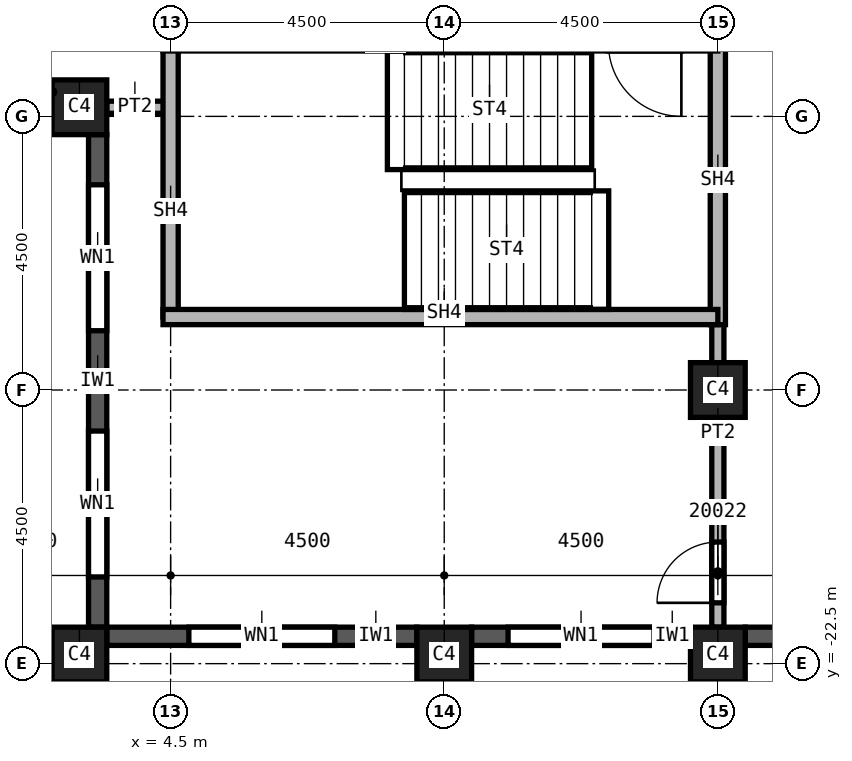
"""IFC4 building model, lengths in metres.
Left out: names, types, materials, properties, quantities, classifications, styles, units other than length and angle.
Written with IfcOpenShell. Run it as: python <this file> out.ifc"""

import sys

from ifc_helpers import new_model, si_unit, direction, frame, frame_2d, origin, origin_2d, place, context, subcontext, project, spatial, rectangle, extrude, element, fill, save


model = new_model("IFC4")
c1 = context("Model", 3, precision=1e-05, world=origin(), true_north=direction((0.0, 1.0)))
c2 = subcontext(c1, "Body", "Model", "MODEL_VIEW")
j1 = project(units=[si_unit("LENGTHUNIT", "METRE"), si_unit("PLANEANGLEUNIT", "RADIAN")], contexts=[c1])
p1 = place(None, origin())
s1 = spatial("IfcSite", under=j1, at=p1, CompositionType="ELEMENT")
p2 = place(p1, origin())
s2 = spatial("IfcBuilding", under=s1, at=p2, CompositionType="ELEMENT")
p3 = place(p2, frame((0.0, 0.0, 290.0)))
s3 = spatial("IfcBuildingStorey", under=s2, at=p3, CompositionType="ELEMENT", Elevation=290.0)
for number, where, z_axis, x_axis in (
    (1, (13.5, -18.0, 0.0), (0.0, 0.0, 1.0), (1.0, 0.0, 0.0)),
    (2, (3.0, -22.35, 0.0), (0.0, 0.0, 1.0), (1.0, 0.0, 0.0)),
    (3, (9.0, -22.35, 0.0), (0.0, 0.0, 1.0), (1.0, 0.0, 0.0)),
    (4, (13.5, -22.35, 0.0), (0.0, 0.0, 1.0), (1.0, 0.0, 0.0)),
    (5, (3.0, -13.35, 0.0), (0.0, 0.0, 1.0), (1.0, 0.0, 0.0)),
):
    element("IfcColumn", number, at=place(p3, frame(where, z_axis=z_axis, x_axis=x_axis)), inside=s3, PredefinedType="COLUMN", context=c2, shape_type="SweptSolid", body=[
        extrude(rectangle(XDim=0.9, YDim=0.9, at=origin_2d()), origin(), (0.0, 0.0, 1.0), 3.59),
    ])
p4 = place(p3, frame((3.3, -13.8, 0.0), z_axis=(0.0, 0.0, 1.0), x_axis=(0.0, -1.0, 0.0)))
e6 = element("IfcWall", 6, at=p4, inside=s3, PredefinedType="SOLIDWALL", context=c2, shape_type="SweptSolid", body=[
    extrude(rectangle(XDim=8.1, YDim=0.3, at=frame_2d((4.05, 0.0))), origin(), (0.0, 0.0, 1.0), 2.99),
])
p5 = place(p4, frame((0.825, 0.0, 0.8)))
e7 = element("IfcOpeningElement", 7, at=p5, cuts=e6, PredefinedType="OPENING", context=c2, shape_type="SweptSolid", body=[
    extrude(rectangle(XDim=2.4, YDim=1.95, at=frame_2d((1.2, 0.975))), frame((0.0, 0.15, 0.0), z_axis=(0.0, -1.0, 0.0), x_axis=(1.0, 0.0, 0.0)), (0.0, 0.0, 1.0), 0.3),
])
p6 = place(p4, frame((4.875, 0.0, 0.8)))
e8 = element("IfcOpeningElement", 8, at=p6, cuts=e6, PredefinedType="OPENING", context=c2, shape_type="SweptSolid", body=[
    extrude(rectangle(XDim=2.4, YDim=1.95, at=frame_2d((1.2, 0.975))), frame((0.0, 0.15, 0.0), z_axis=(0.0, -1.0, 0.0), x_axis=(1.0, 0.0, 0.0)), (0.0, 0.0, 1.0), 0.3),
])
p7 = place(p3, frame((3.45, -22.05, 0.0), z_axis=(0.0, 0.0, 1.0), x_axis=(1.0, 0.0, 0.0)))
e9 = element("IfcWall", 9, at=p7, inside=s3, PredefinedType="SOLIDWALL", context=c2, shape_type="SweptSolid", body=[
    extrude(rectangle(XDim=5.1, YDim=0.3, at=frame_2d((2.55, 0.0))), origin(), (0.0, 0.0, 1.0), 2.99),
])
p8 = place(p7, frame((1.35, 0.0, 0.8)))
e10 = element("IfcOpeningElement", 10, at=p8, cuts=e9, PredefinedType="OPENING", context=c2, shape_type="SweptSolid", body=[
    extrude(rectangle(XDim=2.4, YDim=1.95, at=frame_2d((1.2, 0.975))), frame((0.0, 0.15, 0.0), z_axis=(0.0, -1.0, 0.0), x_axis=(1.0, 0.0, 0.0)), (0.0, 0.0, 1.0), 0.3),
])
p9 = place(p3, frame((9.45, -22.05, 0.0), z_axis=(0.0, 0.0, 1.0), x_axis=(1.0, 0.0, 0.0)))
e11 = element("IfcWall", 11, at=p9, inside=s3, PredefinedType="SOLIDWALL", context=c2, shape_type="SweptSolid", body=[
    extrude(rectangle(XDim=3.6, YDim=0.3, at=frame_2d((1.8, 0.0))), origin(), (0.0, 0.0, 1.0), 2.99),
])
p10 = place(p9, frame((0.6, 0.0, 0.8)))
e12 = element("IfcOpeningElement", 12, at=p10, cuts=e11, PredefinedType="OPENING", context=c2, shape_type="SweptSolid", body=[
    extrude(rectangle(XDim=2.4, YDim=1.95, at=frame_2d((1.2, 0.975))), frame((0.0, 0.15, 0.0), z_axis=(0.0, -1.0, 0.0), x_axis=(1.0, 0.0, 0.0)), (0.0, 0.0, 1.0), 0.3),
])
p11 = place(p3, frame((13.95, -22.05, 0.0), z_axis=(0.0, 0.0, 1.0), x_axis=(1.0, 0.0, 0.0)))
e13 = element("IfcWall", 13, at=p11, inside=s3, PredefinedType="SOLIDWALL", context=c2, shape_type="SweptSolid", body=[
    extrude(rectangle(XDim=3.6, YDim=0.3, at=frame_2d((1.8, 0.0))), origin(), (0.0, 0.0, 1.0), 2.99),
])
p12 = place(p11, frame((0.625, 0.0, 0.8)))
e14 = element("IfcOpeningElement", 14, at=p12, cuts=e13, PredefinedType="OPENING", context=c2, shape_type="SweptSolid", body=[
    extrude(rectangle(XDim=0.6, YDim=1.95, at=frame_2d((0.3, 0.975))), frame((0.0, 0.15, 0.0), z_axis=(0.0, -1.0, 0.0), x_axis=(1.0, 0.0, 0.0)), (0.0, 0.0, 1.0), 0.3),
])
p13 = place(p11, frame((1.825, 0.0, 0.8)))
e15 = element("IfcOpeningElement", 15, at=p13, cuts=e13, PredefinedType="OPENING", context=c2, shape_type="SweptSolid", body=[
    extrude(rectangle(XDim=1.0, YDim=1.95, at=frame_2d((0.5, 0.975))), frame((0.0, 0.15, 0.0), z_axis=(0.0, -1.0, 0.0), x_axis=(1.0, 0.0, 0.0)), (0.0, 0.0, 1.0), 0.3),
])
p14 = place(p3, frame((4.5, -13.35, 0.0), z_axis=(0.0, 0.0, 1.0), x_axis=(-1.0, 0.0, 0.0)))
e16 = element("IfcWall", 16, at=p14, inside=s3, PredefinedType="PARTITIONING", context=c2, shape_type="SweptSolid", body=[
    extrude(rectangle(XDim=1.05, YDim=0.2, at=frame_2d((0.525, 0.0))), origin(), (0.0, 0.0, 1.0), 3.59),
])
p15 = place(p3, frame((13.5, -21.9, 0.0), z_axis=(0.0, 0.0, 1.0), x_axis=(0.0, 1.0, 0.0)))
e17 = element("IfcWall", 17, at=p15, inside=s3, PredefinedType="PARTITIONING", context=c2, shape_type="SweptSolid", body=[
    extrude(rectangle(XDim=5.225, YDim=0.2, at=frame_2d((2.612, 0.0))), origin(), (0.0, 0.0, 1.0), 3.59),
])
p16 = place(p15, frame((0.4, 0.0, 0.0)))
e18 = element("IfcOpeningElement", 18, at=p16, cuts=e17, PredefinedType="OPENING", context=c2, shape_type="SweptSolid", body=[
    extrude(rectangle(XDim=1.0, YDim=2.1, at=frame_2d((0.5, 1.05))), frame((0.0, 0.1, 0.0), z_axis=(0.0, -1.0, 0.0), x_axis=(1.0, 0.0, 0.0)), (0.0, 0.0, 1.0), 0.2),
])
p17 = place(p3, frame((4.5, -16.8, 0.0), z_axis=(0.0, 0.0, 1.0), x_axis=(0.0, 1.0, 0.0)))
e19 = element("IfcWall", 19, at=p17, inside=s3, PredefinedType="SOLIDWALL", context=c2, shape_type="SweptSolid", body=[
    extrude(rectangle(XDim=4.5, YDim=0.25, at=frame_2d((2.25, 0.0))), origin(), (0.0, 0.0, 1.0), 3.59),
])
p18 = place(p3, frame((13.5, -16.925, 0.0), z_axis=(0.0, 0.0, 1.0), x_axis=(0.0, 1.0, 0.0)))
e20 = element("IfcWall", 20, at=p18, inside=s3, PredefinedType="SOLIDWALL", context=c2, shape_type="SweptSolid", body=[
    extrude(rectangle(XDim=4.75, YDim=0.25, at=frame_2d((2.375, 0.0))), origin(), (0.0, 0.0, 1.0), 3.59),
])
p19 = place(p3, frame((13.5, -16.8, 0.0), z_axis=(0.0, 0.0, 1.0), x_axis=(-1.0, 0.0, 0.0)))
e21 = element("IfcWall", 21, at=p19, inside=s3, PredefinedType="SOLIDWALL", context=c2, shape_type="SweptSolid", body=[
    extrude(rectangle(XDim=9.125, YDim=0.25, at=frame_2d((4.562, 0.0))), origin(), (0.0, 0.0, 1.0), 3.59),
])
p20 = place(p5, origin())
e22 = element("IfcWindow", 22, at=p20, inside=s3, PartitioningType="SINGLE_PANEL", PredefinedType="WINDOW", context=c2, shape_type="SweptSolid", body=[
    extrude(rectangle(XDim=2.4, YDim=1.95, at=frame_2d((1.2, 0.975))), frame((0.0, 0.03, 0.0), z_axis=(0.0, -1.0, 0.0), x_axis=(1.0, 0.0, 0.0)), (0.0, 0.0, 1.0), 0.06),
])
fill(e7, e22)
p21 = place(p6, origin())
e23 = element("IfcWindow", 23, at=p21, inside=s3, PartitioningType="SINGLE_PANEL", PredefinedType="WINDOW", context=c2, shape_type="SweptSolid", body=[
    extrude(rectangle(XDim=2.4, YDim=1.95, at=frame_2d((1.2, 0.975))), frame((0.0, 0.03, 0.0), z_axis=(0.0, -1.0, 0.0), x_axis=(1.0, 0.0, 0.0)), (0.0, 0.0, 1.0), 0.06),
])
fill(e8, e23)
p22 = place(p8, origin())
e24 = element("IfcWindow", 24, at=p22, inside=s3, PartitioningType="SINGLE_PANEL", PredefinedType="WINDOW", context=c2, shape_type="SweptSolid", body=[
    extrude(rectangle(XDim=2.4, YDim=1.95, at=frame_2d((1.2, 0.975))), frame((0.0, 0.03, 0.0), z_axis=(0.0, -1.0, 0.0), x_axis=(1.0, 0.0, 0.0)), (0.0, 0.0, 1.0), 0.06),
])
fill(e10, e24)
p23 = place(p10, origin())
e25 = element("IfcWindow", 25, at=p23, inside=s3, PartitioningType="SINGLE_PANEL", PredefinedType="WINDOW", context=c2, shape_type="SweptSolid", body=[
    extrude(rectangle(XDim=2.4, YDim=1.95, at=frame_2d((1.2, 0.975))), frame((0.0, 0.03, 0.0), z_axis=(0.0, -1.0, 0.0), x_axis=(1.0, 0.0, 0.0)), (0.0, 0.0, 1.0), 0.06),
])
fill(e12, e25)
p24 = place(p16, origin())
e26 = element("IfcDoor", 26, at=p24, inside=s3, OperationType="SINGLE_SWING_LEFT", PredefinedType="DOOR", context=c2, shape_type="SweptSolid", body=[
    extrude(rectangle(XDim=1.0, YDim=2.1, at=frame_2d((0.5, 1.05))), frame((0.0, 0.025, 0.0), z_axis=(0.0, -1.0, 0.0), x_axis=(1.0, 0.0, 0.0)), (0.0, 0.0, 1.0), 0.05),
])
fill(e18, e26)
save(model, sys.argv[1])
